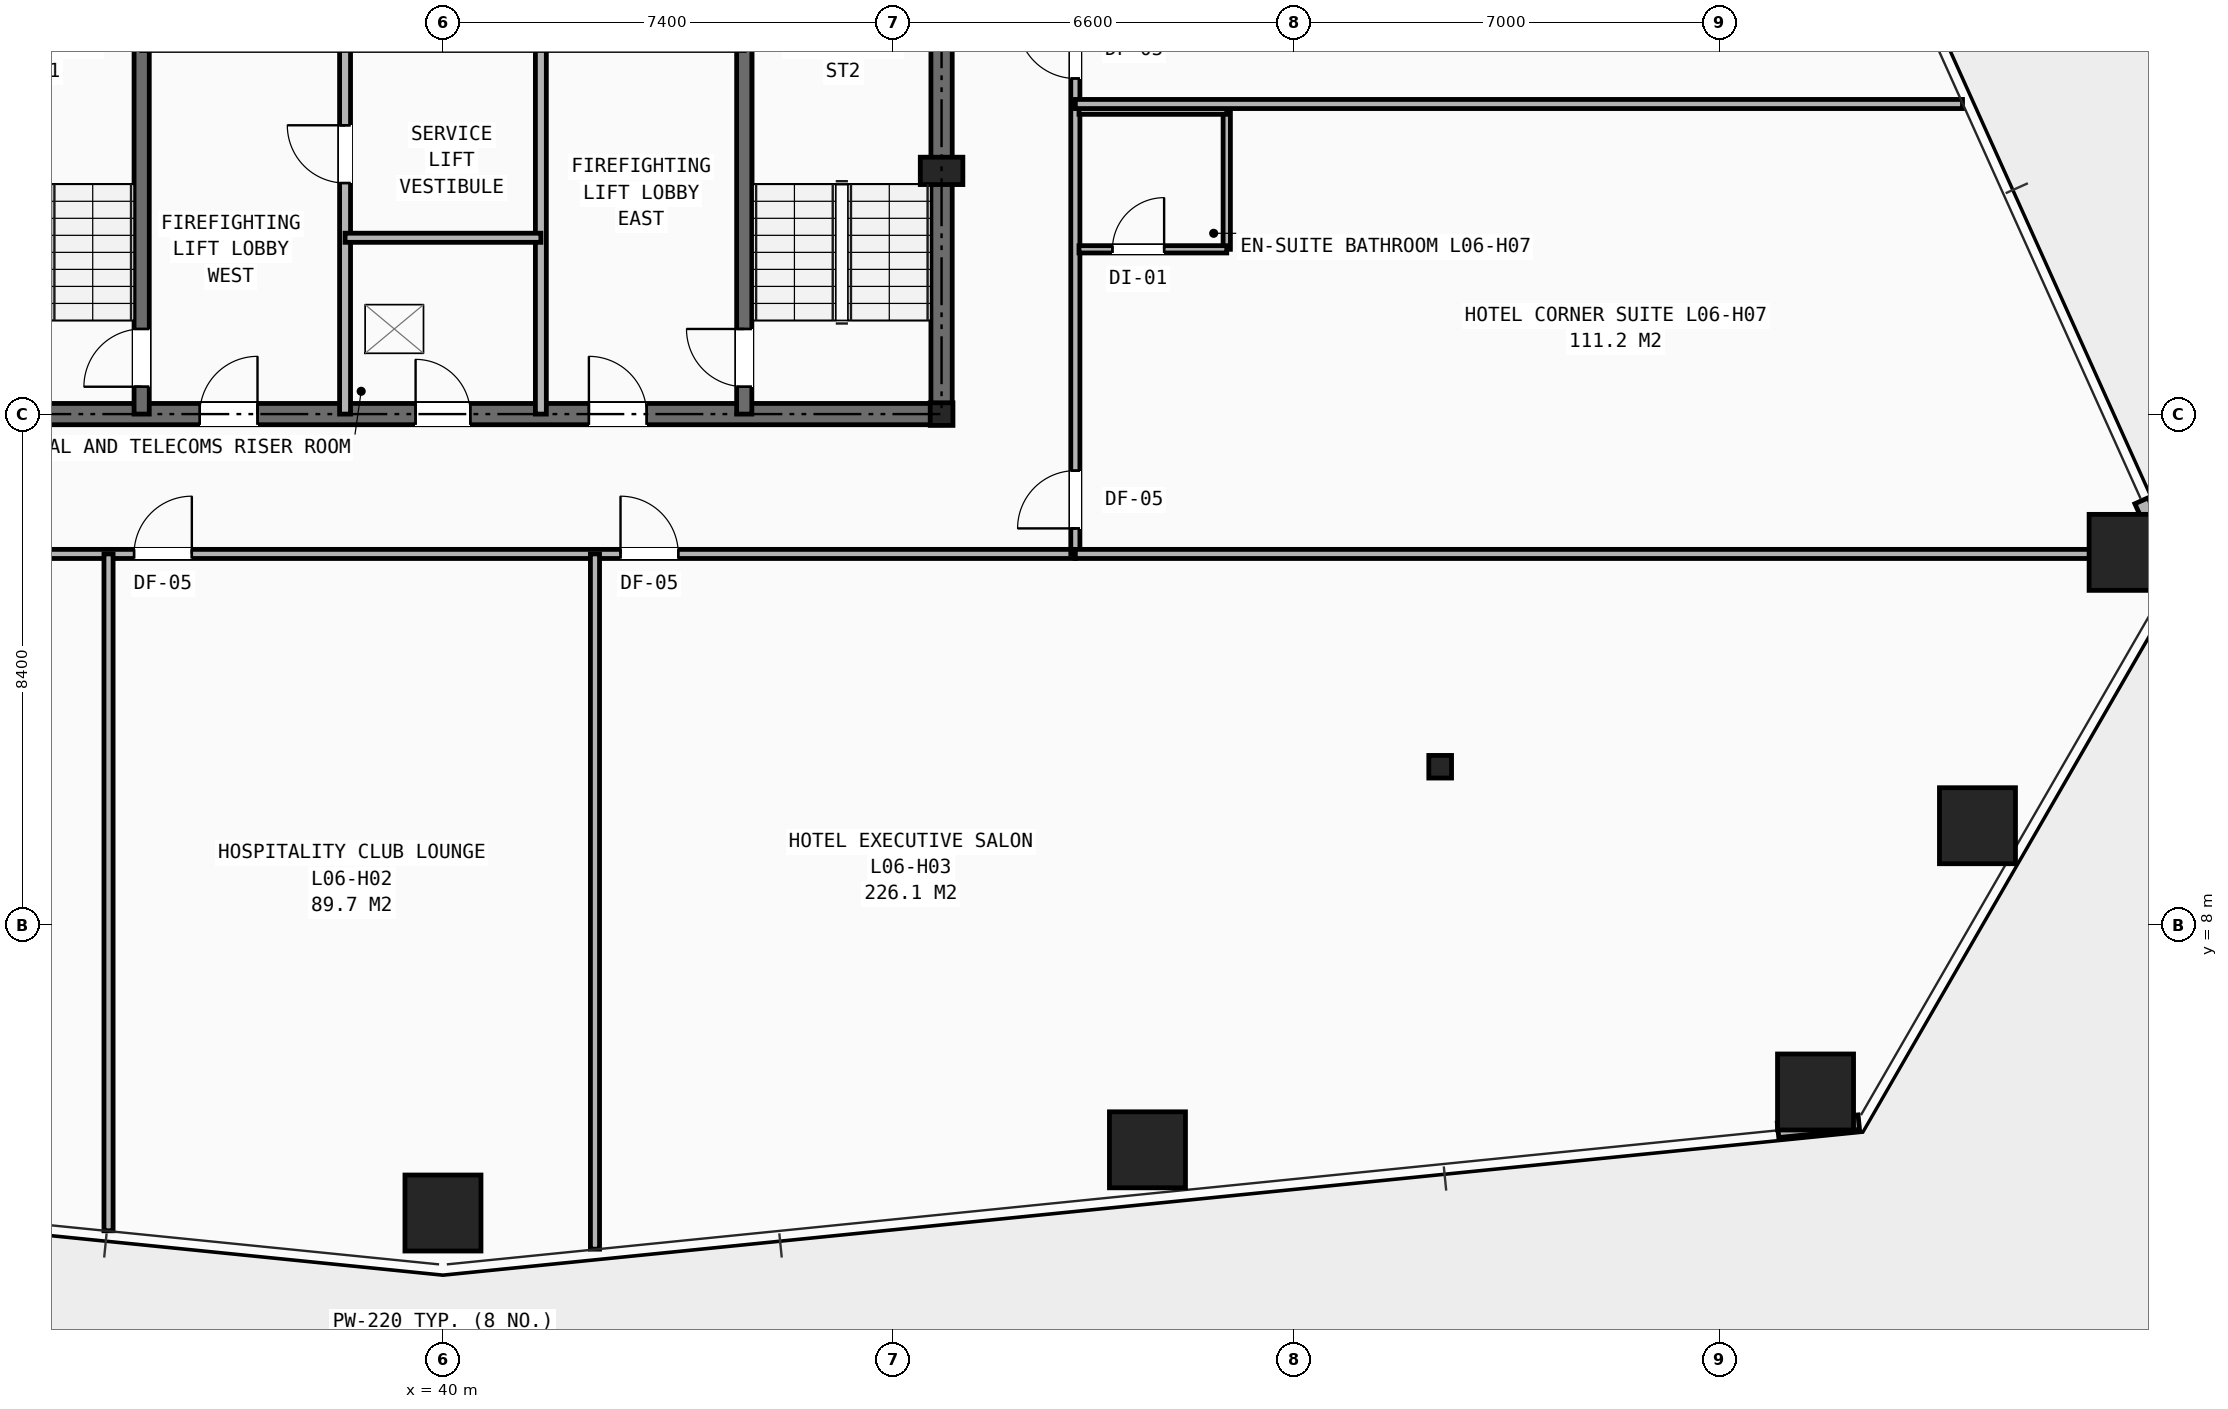
"""IFC4 building model, lengths in metres.
Left out: names, types, materials, properties, quantities, classifications, styles, units other than length and angle.
Written with IfcOpenShell. Run it as: python <this file> out.ifc"""

import sys

from ifc_helpers import new_model, si_unit, direction, frame, frame_2d, origin, origin_2d, place, context, subcontext, project, spatial, rectangle, hollow_rectangle, i_section, extrude, element, fill, save


model = new_model("IFC4")
c1 = context("Model", 3, precision=1e-05, world=origin(), true_north=direction((0.0, 1.0)))
c2 = subcontext(c1, "Body", "Model", "MODEL_VIEW")
j1 = project(units=[si_unit("LENGTHUNIT", "METRE"), si_unit("PLANEANGLEUNIT", "RADIAN")], contexts=[c1])
p1 = place(None, origin())
s1 = spatial("IfcSite", under=j1, at=p1, CompositionType="ELEMENT")
p2 = place(p1, origin())
s2 = spatial("IfcBuilding", under=s1, at=p2, CompositionType="ELEMENT")
p3 = place(p2, frame((0.0, 0.0, 27.2)))
s3 = spatial("IfcBuildingStorey", under=s2, at=p3, CompositionType="ELEMENT", Elevation=27.2)
for number, where, z_axis, x_axis in (
    (1, (48.2, 16.4, 0.0), (0.0, 0.0, 1.0), (1.0, 0.0, 0.0)),
    (2, (56.4, 10.6, 0.0), (0.0, 0.0, 1.0), (1.0, 0.0, 0.0)),
):
    element("IfcColumn", number, at=place(p3, frame(where, z_axis=z_axis, x_axis=x_axis)), inside=s3, PredefinedType="COLUMN", context=c2, shape_type="SweptSolid", body=[
        extrude(i_section(OverallWidth=0.374, OverallDepth=0.372, WebThickness=0.016, FlangeThickness=0.026, at=origin_2d()), origin(), (0.0, 0.0, 1.0), 3.2),
    ])
p4 = place(p3, frame((48.2, 20.4, 0.0), z_axis=(0.0, 0.0, 1.0), x_axis=(1.0, 0.0, 0.0)))
e3 = element("IfcColumn", 3, at=p4, inside=s3, PredefinedType="PILASTER", context=c2, shape_type="SweptSolid", body=[
    extrude(rectangle(XDim=0.7, YDim=0.45, at=origin_2d()), origin(), (0.0, 0.0, 1.0), 3.2),
])
for number, where, z_axis, x_axis in (
    (4, (40.0, 3.26, 0.0), (0.0, 0.0, 1.0), (1.0, 0.0, 0.0)),
    (5, (51.586, 4.3, 0.0), (0.0, 0.0, 1.0), (1.0, 0.0, 0.0)),
    (6, (62.573, 5.251, 0.0), (0.0, 0.0, 1.0), (1.0, 0.0, 0.0)),
    (7, (65.236, 9.63, 0.0), (0.0, 0.0, 1.0), (1.0, 0.0, 0.0)),
    (8, (67.697, 14.126, 0.0), (0.0, 0.0, 1.0), (1.0, 0.0, 0.0)),
):
    element("IfcColumn", number, at=place(p3, frame(where, z_axis=z_axis, x_axis=x_axis)), inside=s3, PredefinedType="COLUMN", context=c2, shape_type="SweptSolid", body=[
        extrude(hollow_rectangle(XDim=1.25, YDim=1.25, WallThickness=0.08, at=origin_2d()), origin(), (0.0, 0.0, 1.0), 3.2),
    ])
p5 = place(p3, frame((61.957, 4.621, 0.0), z_axis=(0.0, 0.0, 1.0), x_axis=(0.994962653924, 0.100246283205, 0.0)))
e9 = element("IfcWall", 9, at=p5, inside=s3, PredefinedType="SHEAR", context=c2, shape_type="SweptSolid", body=[
    extrude(rectangle(XDim=1.335, YDim=0.24, at=frame_2d((0.667, 0.0))), origin(), (0.0, 0.0, 1.0), 2.263),
])
p6 = place(p3, frame((68.483, 13.758, 0.0), z_axis=(0.0, 0.0, 1.0), x_axis=(-0.410767856127, 0.91173996752, 0.0)))
e10 = element("IfcWall", 10, at=p6, inside=s3, PredefinedType="SHEAR", context=c2, shape_type="SweptSolid", body=[
    extrude(rectangle(XDim=1.334, YDim=0.24, at=frame_2d((0.667, 0.0))), origin(), (0.0, 0.0, 1.0), 2.263),
])
p7 = place(p3, frame((31.8, 16.4, 0.0), z_axis=(0.0, 0.0, 1.0), x_axis=(1.0, 0.0, 0.0)))
e11 = element("IfcWall", 11, at=p7, inside=s3, PredefinedType="SHEAR", context=c2, shape_type="SweptSolid", body=[
    extrude(rectangle(XDim=16.4, YDim=0.35, at=frame_2d((8.2, 0.0))), origin(), (0.0, 0.0, 1.0), 2.98),
])
p8 = place(p7, frame((7.75, 0.0, 0.0)))
e12 = element("IfcOpeningElement", 12, at=p8, cuts=e11, PredefinedType="OPENING", context=c2, shape_type="SweptSolid", body=[
    extrude(rectangle(XDim=0.9, YDim=2.1, at=frame_2d((0.45, 1.05))), frame((0.0, 0.185, 0.0), z_axis=(0.0, -1.0, 0.0), x_axis=(1.0, 0.0, 0.0)), (0.0, 0.0, 1.0), 0.37),
])
p9 = place(p7, frame((4.2, 0.0, 0.0)))
e13 = element("IfcOpeningElement", 13, at=p9, cuts=e11, PredefinedType="OPENING", context=c2, shape_type="SweptSolid", body=[
    extrude(rectangle(XDim=0.95, YDim=2.1, at=frame_2d((0.475, 1.05))), frame((0.0, 0.185, 0.0), z_axis=(0.0, -1.0, 0.0), x_axis=(1.0, 0.0, 0.0)), (0.0, 0.0, 1.0), 0.37),
])
p10 = place(p7, frame((10.6, 0.0, 0.0)))
e14 = element("IfcOpeningElement", 14, at=p10, cuts=e11, PredefinedType="OPENING", context=c2, shape_type="SweptSolid", body=[
    extrude(rectangle(XDim=0.95, YDim=2.1, at=frame_2d((0.475, 1.05))), frame((0.0, 0.185, 0.0), z_axis=(0.0, -1.0, 0.0), x_axis=(1.0, 0.0, 0.0)), (0.0, 0.0, 1.0), 0.37),
])
p11 = place(p3, frame((48.2, 16.4, 0.0), z_axis=(0.0, 0.0, 1.0), x_axis=(0.0, 1.0, 0.0)))
e15 = element("IfcWall", 15, at=p11, inside=s3, PredefinedType="SHEAR", context=c2, shape_type="SweptSolid", body=[
    extrude(rectangle(XDim=14.8, YDim=0.35, at=frame_2d((7.4, 0.0))), origin(), (0.0, 0.0, 1.0), 2.98),
])
p12 = place(p11, frame((11.0, 0.0, 0.0)))
e16 = element("IfcOpeningElement", 16, at=p12, cuts=e15, PredefinedType="OPENING", context=c2, shape_type="SweptSolid", body=[
    extrude(rectangle(XDim=1.1, YDim=2.15, at=frame_2d((0.55, 1.075))), frame((0.0, 0.185, 0.0), z_axis=(0.0, -1.0, 0.0), x_axis=(1.0, 0.0, 0.0)), (0.0, 0.0, 1.0), 0.37),
])
p13 = place(p3, frame((35.045, 16.4, 0.0), z_axis=(0.0, 0.0, 1.0), x_axis=(0.0, 1.0, 0.0)))
e17 = element("IfcWall", 17, at=p13, inside=s3, PredefinedType="SHEAR", context=c2, shape_type="SweptSolid", body=[
    extrude(rectangle(XDim=8.4, YDim=0.25, at=frame_2d((4.2, 0.0))), origin(), (0.0, 0.0, 1.0), 2.98),
])
p14 = place(p13, frame((0.45, 0.0, 0.0)))
e18 = element("IfcOpeningElement", 18, at=p14, cuts=e17, PredefinedType="OPENING", context=c2, shape_type="SweptSolid", body=[
    extrude(rectangle(XDim=0.95, YDim=2.1, at=frame_2d((0.475, 1.05))), frame((0.0, 0.135, 0.0), z_axis=(0.0, -1.0, 0.0), x_axis=(1.0, 0.0, 0.0)), (0.0, 0.0, 1.0), 0.27),
])
p15 = place(p3, frame((44.955, 16.4, 0.0), z_axis=(0.0, 0.0, 1.0), x_axis=(0.0, 1.0, 0.0)))
e19 = element("IfcWall", 19, at=p15, inside=s3, PredefinedType="SHEAR", context=c2, shape_type="SweptSolid", body=[
    extrude(rectangle(XDim=8.4, YDim=0.25, at=frame_2d((4.2, 0.0))), origin(), (0.0, 0.0, 1.0), 2.98),
])
p16 = place(p15, frame((0.45, 0.0, 0.0)))
e20 = element("IfcOpeningElement", 20, at=p16, cuts=e19, PredefinedType="OPENING", context=c2, shape_type="SweptSolid", body=[
    extrude(rectangle(XDim=0.95, YDim=2.1, at=frame_2d((0.475, 1.05))), frame((0.0, 0.135, 0.0), z_axis=(0.0, -1.0, 0.0), x_axis=(1.0, 0.0, 0.0)), (0.0, 0.0, 1.0), 0.27),
])
p17 = place(p3, frame((38.39, 16.4, 0.0), z_axis=(0.0, 0.0, 1.0), x_axis=(0.0, 1.0, 0.0)))
e21 = element("IfcWall", 21, at=p17, inside=s3, PredefinedType="PARTITIONING", context=c2, shape_type="SweptSolid", body=[
    extrude(rectangle(XDim=8.4, YDim=0.18, at=frame_2d((4.2, 0.0))), origin(), (0.0, 0.0, 1.0), 2.431),
])
p18 = place(p17, frame((3.8, 0.0, 0.0)))
e22 = element("IfcOpeningElement", 22, at=p18, cuts=e21, PredefinedType="OPENING", context=c2, shape_type="SweptSolid", body=[
    extrude(rectangle(XDim=0.95, YDim=2.1, at=frame_2d((0.475, 1.05))), frame((0.0, 0.1, 0.0), z_axis=(0.0, -1.0, 0.0), x_axis=(1.0, 0.0, 0.0)), (0.0, 0.0, 1.0), 0.2),
])
p19 = place(p3, frame((41.61, 16.4, 0.0), z_axis=(0.0, 0.0, 1.0), x_axis=(0.0, 1.0, 0.0)))
e23 = element("IfcWall", 23, at=p19, inside=s3, PredefinedType="PARTITIONING", context=c2, shape_type="SweptSolid", body=[
    extrude(rectangle(XDim=8.4, YDim=0.18, at=frame_2d((4.2, 0.0))), origin(), (0.0, 0.0, 1.0), 2.431),
])
p20 = place(p3, frame((38.39, 19.3, 0.0), z_axis=(0.0, 0.0, 1.0), x_axis=(1.0, 0.0, 0.0)))
e24 = element("IfcWall", 24, at=p20, inside=s3, PredefinedType="PARTITIONING", context=c2, shape_type="SweptSolid", body=[
    extrude(rectangle(XDim=3.22, YDim=0.15, at=frame_2d((1.61, 0.0))), origin(), (0.0, 0.0, 1.0), 2.98),
])
p21 = place(p3, frame((29.6, 14.1, 0.0), z_axis=(0.0, 0.0, 1.0), x_axis=(1.0, 0.0, 0.0)))
e25 = element("IfcWall", 25, at=p21, inside=s3, PredefinedType="PARTITIONING", context=c2, shape_type="SweptSolid", body=[
    extrude(rectangle(XDim=20.8, YDim=0.15, at=frame_2d((10.4, 0.0))), origin(), (0.0, 0.0, 1.0), 2.431),
])
p22 = place(p21, frame((0.57, 0.0, 0.0)))
e26 = element("IfcOpeningElement", 26, at=p22, cuts=e25, PredefinedType="OPENING", context=c2, shape_type="SweptSolid", body=[
    extrude(rectangle(XDim=0.95, YDim=2.1, at=frame_2d((0.475, 1.05))), frame((0.0, 0.085, 0.0), z_axis=(0.0, -1.0, 0.0), x_axis=(1.0, 0.0, 0.0)), (0.0, 0.0, 1.0), 0.17),
])
p23 = place(p21, frame((5.32, 0.0, 0.0)))
e27 = element("IfcOpeningElement", 27, at=p23, cuts=e25, PredefinedType="OPENING", context=c2, shape_type="SweptSolid", body=[
    extrude(rectangle(XDim=0.95, YDim=2.1, at=frame_2d((0.475, 1.05))), frame((0.0, 0.085, 0.0), z_axis=(0.0, -1.0, 0.0), x_axis=(1.0, 0.0, 0.0)), (0.0, 0.0, 1.0), 0.17),
])
p24 = place(p21, frame((13.32, 0.0, 0.0)))
e28 = element("IfcOpeningElement", 28, at=p24, cuts=e25, PredefinedType="OPENING", context=c2, shape_type="SweptSolid", body=[
    extrude(rectangle(XDim=0.95, YDim=2.1, at=frame_2d((0.475, 1.05))), frame((0.0, 0.085, 0.0), z_axis=(0.0, -1.0, 0.0), x_axis=(1.0, 0.0, 0.0)), (0.0, 0.0, 1.0), 0.17),
])
p25 = place(p3, frame((50.4, 14.1, 0.0), z_axis=(0.0, 0.0, 1.0), x_axis=(0.0, 1.0, 0.0)))
e29 = element("IfcWall", 29, at=p25, inside=s3, PredefinedType="PARTITIONING", context=c2, shape_type="SweptSolid", body=[
    extrude(rectangle(XDim=21.9, YDim=0.15, at=frame_2d((10.95, 0.0))), origin(), (0.0, 0.0, 1.0), 2.431),
])
p26 = place(p25, frame((0.42, 0.0, 0.0)))
e30 = element("IfcOpeningElement", 30, at=p26, cuts=e29, PredefinedType="OPENING", context=c2, shape_type="SweptSolid", body=[
    extrude(rectangle(XDim=0.95, YDim=2.1, at=frame_2d((0.475, 1.05))), frame((0.0, 0.085, 0.0), z_axis=(0.0, -1.0, 0.0), x_axis=(1.0, 0.0, 0.0)), (0.0, 0.0, 1.0), 0.17),
])
p27 = place(p25, frame((7.82, 0.0, 0.0)))
e31 = element("IfcOpeningElement", 31, at=p27, cuts=e29, PredefinedType="OPENING", context=c2, shape_type="SweptSolid", body=[
    extrude(rectangle(XDim=0.95, YDim=2.1, at=frame_2d((0.475, 1.05))), frame((0.0, 0.085, 0.0), z_axis=(0.0, -1.0, 0.0), x_axis=(1.0, 0.0, 0.0)), (0.0, 0.0, 1.0), 0.17),
])
p28 = place(p25, frame((15.32, 0.0, 0.0)))
e32 = element("IfcOpeningElement", 32, at=p28, cuts=e29, PredefinedType="OPENING", context=c2, shape_type="SweptSolid", body=[
    extrude(rectangle(XDim=0.95, YDim=2.1, at=frame_2d((0.475, 1.05))), frame((0.0, 0.085, 0.0), z_axis=(0.0, -1.0, 0.0), x_axis=(1.0, 0.0, 0.0)), (0.0, 0.0, 1.0), 0.17),
])
p29 = place(p3, frame((34.5, 2.968, 0.0), z_axis=(0.0, 0.0, 1.0), x_axis=(0.0, 1.0, 0.0)))
e33 = element("IfcWall", 33, at=p29, inside=s3, PredefinedType="PARTITIONING", context=c2, shape_type="SweptSolid", body=[
    extrude(rectangle(XDim=11.132, YDim=0.15, at=frame_2d((5.566, 0.0))), origin(), (0.0, 0.0, 1.0), 2.268),
])
p30 = place(p3, frame((42.5, 2.666, 0.0), z_axis=(0.0, 0.0, 1.0), x_axis=(0.0, 1.0, 0.0)))
e34 = element("IfcWall", 34, at=p30, inside=s3, PredefinedType="PARTITIONING", context=c2, shape_type="SweptSolid", body=[
    extrude(rectangle(XDim=11.434, YDim=0.15, at=frame_2d((5.717, 0.0))), origin(), (0.0, 0.0, 1.0), 2.268),
])
p31 = place(p3, frame((50.4, 14.1, 0.0), z_axis=(0.0, 0.0, 1.0), x_axis=(1.0, 0.0, 0.0)))
e35 = element("IfcWall", 35, at=p31, inside=s3, PredefinedType="PARTITIONING", context=c2, shape_type="SweptSolid", body=[
    extrude(rectangle(XDim=17.923, YDim=0.15, at=frame_2d((8.961, 0.0))), origin(), (0.0, 0.0, 1.0), 2.268),
])
p32 = place(p3, frame((52.89, 19.11, 0.0), z_axis=(0.0, 0.0, 1.0), x_axis=(0.0, 1.0, 0.0)))
e36 = element("IfcWall", 36, at=p32, inside=s3, PredefinedType="PARTITIONING", context=c2, shape_type="SweptSolid", body=[
    extrude(rectangle(XDim=2.28, YDim=0.12, at=frame_2d((1.14, 0.0))), origin(), (0.0, 0.0, 1.0), 2.98),
])
p33 = place(p3, frame((50.46, 19.11, 0.0), z_axis=(0.0, 0.0, 1.0), x_axis=(1.0, 0.0, 0.0)))
e37 = element("IfcWall", 37, at=p33, inside=s3, PredefinedType="PARTITIONING", context=c2, shape_type="SweptSolid", body=[
    extrude(rectangle(XDim=2.43, YDim=0.12, at=frame_2d((1.215, 0.0))), origin(), (0.0, 0.0, 1.0), 2.98),
])
p34 = place(p33, frame((0.55, 0.0, 0.0)))
e38 = element("IfcOpeningElement", 38, at=p34, cuts=e37, PredefinedType="OPENING", context=c2, shape_type="SweptSolid", body=[
    extrude(rectangle(XDim=0.85, YDim=2.05, at=frame_2d((0.425, 1.025))), frame((0.0, 0.07, 0.0), z_axis=(0.0, -1.0, 0.0), x_axis=(1.0, 0.0, 0.0)), (0.0, 0.0, 1.0), 0.14),
])
p35 = place(p3, frame((50.46, 21.39, 0.0), z_axis=(0.0, 0.0, 1.0), x_axis=(1.0, 0.0, 0.0)))
e39 = element("IfcWall", 39, at=p35, inside=s3, PredefinedType="PARTITIONING", context=c2, shape_type="SweptSolid", body=[
    extrude(rectangle(XDim=2.43, YDim=0.12, at=frame_2d((1.215, 0.0))), origin(), (0.0, 0.0, 1.0), 2.98),
])
p36 = place(p3, frame((50.4, 21.5, 0.0), z_axis=(0.0, 0.0, 1.0), x_axis=(1.0, 0.0, 0.0)))
e40 = element("IfcWall", 40, at=p36, inside=s3, PredefinedType="PARTITIONING", context=c2, shape_type="SweptSolid", body=[
    extrude(rectangle(XDim=14.59, YDim=0.15, at=frame_2d((7.295, 0.0))), origin(), (0.0, 0.0, 1.0), 2.268),
])
p37 = place(p8, origin())
e41 = element("IfcDoor", 41, at=p37, inside=s3, OperationType="SINGLE_SWING_LEFT", PredefinedType="DOOR", context=c2, shape_type="SweptSolid", body=[
    extrude(rectangle(XDim=0.9, YDim=2.1, at=frame_2d((0.45, 1.05))), frame((0.0, 0.025, 0.0), z_axis=(0.0, -1.0, 0.0), x_axis=(1.0, 0.0, 0.0)), (0.0, 0.0, 1.0), 0.05),
])
fill(e12, e41)
p38 = place(p18, origin())
e42 = element("IfcDoor", 42, at=p38, inside=s3, OperationType="SINGLE_SWING_RIGHT", PredefinedType="DOOR", context=c2, shape_type="SweptSolid", body=[
    extrude(rectangle(XDim=0.95, YDim=2.1, at=frame_2d((0.475, 1.05))), frame((0.0, 0.025, 0.0), z_axis=(0.0, -1.0, 0.0), x_axis=(1.0, 0.0, 0.0)), (0.0, 0.0, 1.0), 0.05),
])
fill(e22, e42)
p39 = place(p14, origin())
e43 = element("IfcDoor", 43, at=p39, inside=s3, OperationType="SINGLE_SWING_LEFT", PredefinedType="DOOR", context=c2, shape_type="SweptSolid", body=[
    extrude(rectangle(XDim=0.95, YDim=2.1, at=frame_2d((0.475, 1.05))), frame((0.0, 0.025, 0.0), z_axis=(0.0, -1.0, 0.0), x_axis=(1.0, 0.0, 0.0)), (0.0, 0.0, 1.0), 0.05),
])
fill(e18, e43)
p40 = place(p16, origin())
e44 = element("IfcDoor", 44, at=p40, inside=s3, OperationType="SINGLE_SWING_RIGHT", PredefinedType="DOOR", context=c2, shape_type="SweptSolid", body=[
    extrude(rectangle(XDim=0.95, YDim=2.1, at=frame_2d((0.475, 1.05))), frame((0.0, 0.025, 0.0), z_axis=(0.0, -1.0, 0.0), x_axis=(1.0, 0.0, 0.0)), (0.0, 0.0, 1.0), 0.05),
])
fill(e20, e44)
p41 = place(p9, origin())
e45 = element("IfcDoor", 45, at=p41, inside=s3, OperationType="SINGLE_SWING_RIGHT", PredefinedType="DOOR", context=c2, shape_type="SweptSolid", body=[
    extrude(rectangle(XDim=0.95, YDim=2.1, at=frame_2d((0.475, 1.05))), frame((0.0, 0.025, 0.0), z_axis=(0.0, -1.0, 0.0), x_axis=(1.0, 0.0, 0.0)), (0.0, 0.0, 1.0), 0.05),
])
fill(e13, e45)
p42 = place(p10, origin())
e46 = element("IfcDoor", 46, at=p42, inside=s3, OperationType="SINGLE_SWING_LEFT", PredefinedType="DOOR", context=c2, shape_type="SweptSolid", body=[
    extrude(rectangle(XDim=0.95, YDim=2.1, at=frame_2d((0.475, 1.05))), frame((0.0, 0.025, 0.0), z_axis=(0.0, -1.0, 0.0), x_axis=(1.0, 0.0, 0.0)), (0.0, 0.0, 1.0), 0.05),
])
fill(e14, e46)
p43 = place(p23, origin())
e47 = element("IfcDoor", 47, at=p43, inside=s3, OperationType="SINGLE_SWING_RIGHT", PredefinedType="DOOR", context=c2, shape_type="SweptSolid", body=[
    extrude(rectangle(XDim=0.95, YDim=2.1, at=frame_2d((0.475, 1.05))), frame((0.0, 0.025, 0.0), z_axis=(0.0, -1.0, 0.0), x_axis=(1.0, 0.0, 0.0)), (0.0, 0.0, 1.0), 0.05),
])
fill(e27, e47)
p44 = place(p24, origin())
e48 = element("IfcDoor", 48, at=p44, inside=s3, OperationType="SINGLE_SWING_LEFT", PredefinedType="DOOR", context=c2, shape_type="SweptSolid", body=[
    extrude(rectangle(XDim=0.95, YDim=2.1, at=frame_2d((0.475, 1.05))), frame((0.0, 0.025, 0.0), z_axis=(0.0, -1.0, 0.0), x_axis=(1.0, 0.0, 0.0)), (0.0, 0.0, 1.0), 0.05),
])
fill(e28, e48)
p45 = place(p26, origin())
e49 = element("IfcDoor", 49, at=p45, inside=s3, OperationType="SINGLE_SWING_LEFT", PredefinedType="DOOR", context=c2, shape_type="SweptSolid", body=[
    extrude(rectangle(XDim=0.95, YDim=2.1, at=frame_2d((0.475, 1.05))), frame((0.0, 0.025, 0.0), z_axis=(0.0, -1.0, 0.0), x_axis=(1.0, 0.0, 0.0)), (0.0, 0.0, 1.0), 0.05),
])
fill(e30, e49)
p46 = place(p34, origin())
e50 = element("IfcDoor", 50, at=p46, inside=s3, OperationType="SINGLE_SWING_RIGHT", PredefinedType="DOOR", context=c2, shape_type="SweptSolid", body=[
    extrude(rectangle(XDim=0.85, YDim=2.05, at=frame_2d((0.425, 1.025))), frame((0.0, 0.025, 0.0), z_axis=(0.0, -1.0, 0.0), x_axis=(1.0, 0.0, 0.0)), (0.0, 0.0, 1.0), 0.05),
])
fill(e38, e50)
p47 = place(p27, origin())
e51 = element("IfcDoor", 51, at=p47, inside=s3, OperationType="SINGLE_SWING_RIGHT", PredefinedType="DOOR", context=c2, shape_type="SweptSolid", body=[
    extrude(rectangle(XDim=0.95, YDim=2.1, at=frame_2d((0.475, 1.05))), frame((0.0, 0.025, 0.0), z_axis=(0.0, -1.0, 0.0), x_axis=(1.0, 0.0, 0.0)), (0.0, 0.0, 1.0), 0.05),
])
fill(e31, e51)
save(model, sys.argv[1])
